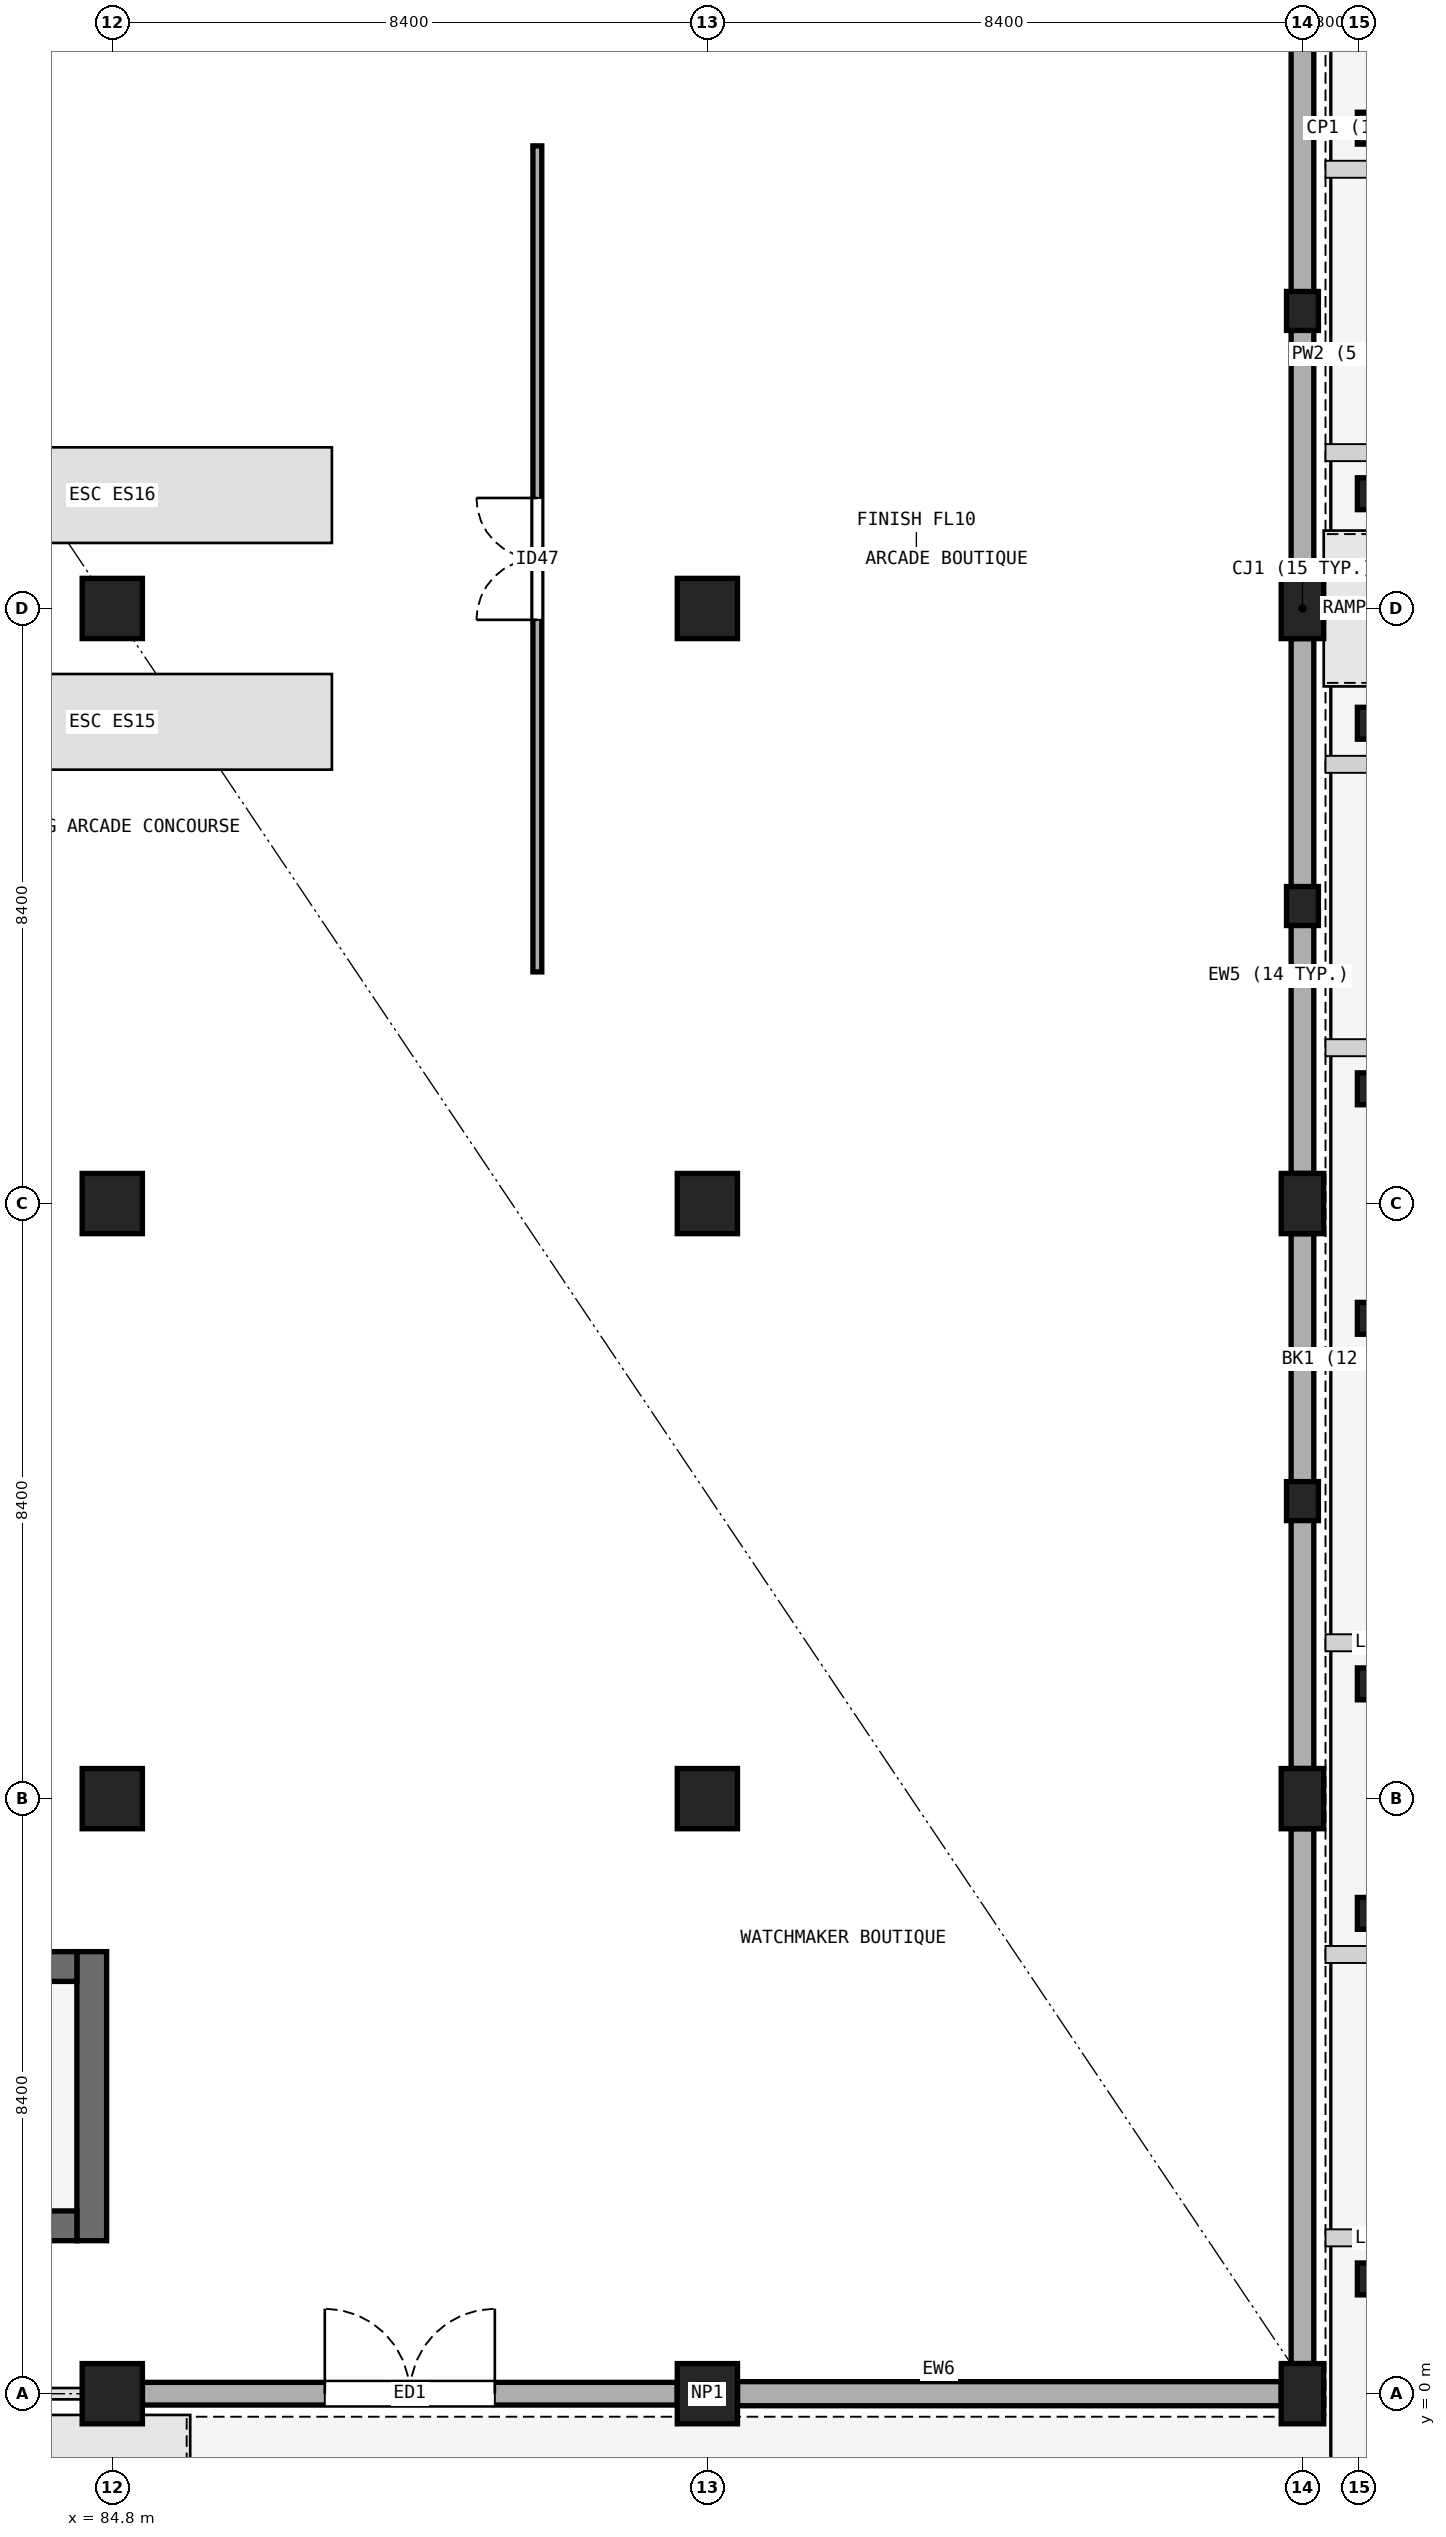
"""IFC4 building model, lengths in metres.
Left out: names, types, materials, properties, quantities, classifications, styles, units other than length and angle.
Written with IfcOpenShell. Run it as: python <this file> out.ifc"""

import sys

from ifc_helpers import new_model, si_unit, direction, frame, frame_2d, origin, origin_2d, place, context, subcontext, project, spatial, rectangle, extrude, element, fill, save


model = new_model("IFC4")
c1 = context("Model", 3, precision=1e-05, world=origin(), true_north=direction((0.0, 1.0)))
c2 = subcontext(c1, "Body", "Model", "MODEL_VIEW")
j1 = project(units=[si_unit("LENGTHUNIT", "METRE"), si_unit("PLANEANGLEUNIT", "RADIAN")], contexts=[c1])
p1 = place(None, origin())
s1 = spatial("IfcSite", under=j1, at=p1, CompositionType="ELEMENT")
p2 = place(p1, origin())
s2 = spatial("IfcBuilding", under=s1, at=p2, CompositionType="ELEMENT")
p3 = place(p2, origin())
s3 = spatial("IfcBuildingStorey", under=s2, at=p3, CompositionType="ELEMENT", Elevation=0.0)
for number, where, z_axis, x_axis in (
    (1, (84.8, 0.0, 0.0), (0.0, 0.0, 1.0), (1.0, 0.0, 0.0)),
    (2, (93.2, 0.0, 0.0), (0.0, 0.0, 1.0), (1.0, 0.0, 0.0)),
):
    element("IfcColumn", number, at=place(p3, frame(where, z_axis=z_axis, x_axis=x_axis)), inside=s3, PredefinedType="COLUMN", context=c2, shape_type="SweptSolid", body=[
        extrude(rectangle(XDim=0.85, YDim=0.85, at=origin_2d()), origin(), (0.0, 0.0, 1.0), 5.4),
    ])
p4 = place(p3, frame((101.6, 0.0, 0.0), z_axis=(0.0, 0.0, 1.0), x_axis=(1.0, 0.0, 0.0)))
e3 = element("IfcColumn", 3, at=p4, inside=s3, PredefinedType="COLUMN", context=c2, shape_type="SweptSolid", body=[
    extrude(rectangle(XDim=0.6, YDim=0.85, at=origin_2d()), origin(), (0.0, 0.0, 1.0), 5.4),
])
for number, where, z_axis, x_axis in (
    (4, (84.8, 8.4, 0.0), (0.0, 0.0, 1.0), (1.0, 0.0, 0.0)),
    (5, (93.2, 8.4, 0.0), (0.0, 0.0, 1.0), (1.0, 0.0, 0.0)),
):
    element("IfcColumn", number, at=place(p3, frame(where, z_axis=z_axis, x_axis=x_axis)), inside=s3, PredefinedType="COLUMN", context=c2, shape_type="SweptSolid", body=[
        extrude(rectangle(XDim=0.85, YDim=0.85, at=origin_2d()), origin(), (0.0, 0.0, 1.0), 5.4),
    ])
p5 = place(p3, frame((101.6, 8.4, 0.0), z_axis=(0.0, 0.0, 1.0), x_axis=(1.0, 0.0, 0.0)))
e6 = element("IfcColumn", 6, at=p5, inside=s3, PredefinedType="COLUMN", context=c2, shape_type="SweptSolid", body=[
    extrude(rectangle(XDim=0.6, YDim=0.85, at=origin_2d()), origin(), (0.0, 0.0, 1.0), 5.4),
])
for number, where, z_axis, x_axis in (
    (7, (84.8, 16.8, 0.0), (0.0, 0.0, 1.0), (1.0, 0.0, 0.0)),
    (8, (93.2, 16.8, 0.0), (0.0, 0.0, 1.0), (1.0, 0.0, 0.0)),
):
    element("IfcColumn", number, at=place(p3, frame(where, z_axis=z_axis, x_axis=x_axis)), inside=s3, PredefinedType="COLUMN", context=c2, shape_type="SweptSolid", body=[
        extrude(rectangle(XDim=0.85, YDim=0.85, at=origin_2d()), origin(), (0.0, 0.0, 1.0), 5.4),
    ])
p6 = place(p3, frame((101.6, 16.8, 0.0), z_axis=(0.0, 0.0, 1.0), x_axis=(1.0, 0.0, 0.0)))
e9 = element("IfcColumn", 9, at=p6, inside=s3, PredefinedType="COLUMN", context=c2, shape_type="SweptSolid", body=[
    extrude(rectangle(XDim=0.6, YDim=0.85, at=origin_2d()), origin(), (0.0, 0.0, 1.0), 5.4),
])
for number, where, z_axis, x_axis in (
    (10, (84.8, 25.2, 0.0), (0.0, 0.0, 1.0), (1.0, 0.0, 0.0)),
    (11, (93.2, 25.2, 0.0), (0.0, 0.0, 1.0), (1.0, 0.0, 0.0)),
):
    element("IfcColumn", number, at=place(p3, frame(where, z_axis=z_axis, x_axis=x_axis)), inside=s3, PredefinedType="COLUMN", context=c2, shape_type="SweptSolid", body=[
        extrude(rectangle(XDim=0.85, YDim=0.85, at=origin_2d()), origin(), (0.0, 0.0, 1.0), 5.4),
    ])
p7 = place(p3, frame((101.6, 25.2, 0.0), z_axis=(0.0, 0.0, 1.0), x_axis=(1.0, 0.0, 0.0)))
e12 = element("IfcColumn", 12, at=p7, inside=s3, PredefinedType="COLUMN", context=c2, shape_type="SweptSolid", body=[
    extrude(rectangle(XDim=0.6, YDim=0.85, at=origin_2d()), origin(), (0.0, 0.0, 1.0), 5.4),
])
for number, where, z_axis, x_axis in (
    (13, (101.6, 12.6, 0.0), (0.0, 0.0, 1.0), (1.0, 0.0, 0.0)),
    (14, (101.6, 21.0, 0.0), (0.0, 0.0, 1.0), (1.0, 0.0, 0.0)),
    (15, (101.6, 29.4, 0.0), (0.0, 0.0, 1.0), (1.0, 0.0, 0.0)),
    (16, (102.65, 1.62, 0.0), (0.0, 0.0, 1.0), (0.0, 1.0, 0.0)),
    (17, (102.65, 6.78, 0.0), (0.0, 0.0, 1.0), (0.0, 1.0, 0.0)),
    (18, (102.65, 10.02, 0.0), (0.0, 0.0, 1.0), (0.0, 1.0, 0.0)),
    (19, (102.65, 15.18, 0.0), (0.0, 0.0, 1.0), (0.0, 1.0, 0.0)),
    (20, (102.65, 18.42, 0.0), (0.0, 0.0, 1.0), (0.0, 1.0, 0.0)),
    (21, (102.65, 23.58, 0.0), (0.0, 0.0, 1.0), (0.0, 1.0, 0.0)),
    (22, (102.65, 26.82, 0.0), (0.0, 0.0, 1.0), (0.0, 1.0, 0.0)),
    (23, (102.65, 31.98, 0.0), (0.0, 0.0, 1.0), (0.0, 1.0, 0.0)),
):
    element("IfcColumn", number, at=place(p3, frame(where, z_axis=z_axis, x_axis=x_axis)), inside=s3, PredefinedType="PILASTER", context=c2, shape_type="SweptSolid", body=[
        extrude(rectangle(XDim=0.45, YDim=0.55, at=origin_2d()), origin(), (0.0, 0.0, 1.0), 5.4),
    ])
p8 = place(p3, frame((85.225, 0.0, 0.0), z_axis=(0.0, 0.0, 1.0), x_axis=(1.0, 0.0, 0.0)))
e24 = element("IfcWall", 24, at=p8, inside=s3, PredefinedType="SOLIDWALL", context=c2, shape_type="SweptSolid", body=[
    extrude(rectangle(XDim=7.55, YDim=0.32, at=frame_2d((3.775, 0.0))), origin(), (0.0, 0.0, 1.0), 4.35),
])
p9 = place(p8, frame((2.575, 0.0, 0.0)))
e25 = element("IfcOpeningElement", 25, at=p9, cuts=e24, PredefinedType="OPENING", context=c2, shape_type="SweptSolid", body=[
    extrude(rectangle(XDim=2.4, YDim=2.6, at=frame_2d((1.2, 1.3))), frame((0.0, 0.17, 0.0), z_axis=(0.0, -1.0, 0.0), x_axis=(1.0, 0.0, 0.0)), (0.0, 0.0, 1.0), 0.34),
])
p10 = place(p3, frame((93.625, 0.0, 0.0), z_axis=(0.0, 0.0, 1.0), x_axis=(1.0, 0.0, 0.0)))
e26 = element("IfcWall", 26, at=p10, inside=s3, PredefinedType="SOLIDWALL", context=c2, shape_type="SweptSolid", body=[
    extrude(rectangle(XDim=7.675, YDim=0.34, at=frame_2d((3.837, 0.0))), origin(), (0.0, 0.0, 1.0), 4.35),
])
for number, where, z_axis, x_axis in (
    (27, (101.6, 0.425, 0.0), (0.0, 0.0, 1.0), (0.0, 1.0, 0.0)),
    (28, (101.6, 8.825, 0.0), (0.0, 0.0, 1.0), (0.0, 1.0, 0.0)),
):
    element("IfcWall", number, at=place(p3, frame(where, z_axis=z_axis, x_axis=x_axis)), inside=s3, PredefinedType="SOLIDWALL", context=c2, shape_type="SweptSolid", body=[
        extrude(rectangle(XDim=7.55, YDim=0.32, at=frame_2d((3.775, 0.0))), origin(), (0.0, 0.0, 1.0), 4.35),
    ])
p11 = place(p3, frame((101.6, 17.225, 0.0), z_axis=(0.0, 0.0, 1.0), x_axis=(0.0, 1.0, 0.0)))
e29 = element("IfcWall", 29, at=p11, inside=s3, PredefinedType="SOLIDWALL", context=c2, shape_type="SweptSolid", body=[
    extrude(rectangle(XDim=7.55, YDim=0.32, at=frame_2d((3.775, 0.0))), origin(), (0.0, 0.0, 1.0), 4.35),
])
p12 = place(p3, frame((101.6, 25.625, 0.0), z_axis=(0.0, 0.0, 1.0), x_axis=(0.0, 1.0, 0.0)))
e30 = element("IfcWall", 30, at=p12, inside=s3, PredefinedType="SOLIDWALL", context=c2, shape_type="SweptSolid", body=[
    extrude(rectangle(XDim=7.55, YDim=0.32, at=frame_2d((3.775, 0.0))), origin(), (0.0, 0.0, 1.0), 4.35),
])
p13 = place(p3, frame((84.51, 2.16, 0.0), z_axis=(0.0, 0.0, 1.0), x_axis=(0.0, 1.0, 0.0)))
e31 = element("IfcWall", 31, at=p13, inside=s3, PredefinedType="SHEAR", context=c2, shape_type="SweptSolid", body=[
    extrude(rectangle(XDim=4.08, YDim=0.42, at=frame_2d((2.04, 0.0))), origin(), (0.0, 0.0, 1.0), 5.1),
])
for number, where, z_axis, x_axis in (
    (32, (76.9, 2.37, 0.0), (0.0, 0.0, 1.0), (1.0, 0.0, 0.0)),
    (33, (76.9, 6.03, 0.0), (0.0, 0.0, 1.0), (1.0, 0.0, 0.0)),
):
    element("IfcWall", number, at=place(p3, frame(where, z_axis=z_axis, x_axis=x_axis)), inside=s3, PredefinedType="SHEAR", context=c2, shape_type="SweptSolid", body=[
        extrude(rectangle(XDim=7.4, YDim=0.42, at=frame_2d((3.7, 0.0))), origin(), (0.0, 0.0, 1.0), 5.1),
    ])
p14 = place(p3, frame((90.8, 20.07, 0.0), z_axis=(0.0, 0.0, 1.0), x_axis=(0.0, 1.0, 0.0)))
e34 = element("IfcWall", 34, at=p14, inside=s3, PredefinedType="PARTITIONING", context=c2, shape_type="SweptSolid", body=[
    extrude(rectangle(XDim=11.66, YDim=0.125, at=frame_2d((5.83, 0.0))), origin(), (0.0, 0.0, 1.0), 4.4),
])
p15 = place(p14, frame((4.97, 0.0, 0.0)))
e35 = element("IfcOpeningElement", 35, at=p15, cuts=e34, PredefinedType="OPENING", context=c2, shape_type="SweptSolid", body=[
    extrude(rectangle(XDim=1.72, YDim=2.1, at=frame_2d((0.86, 1.05))), frame((0.0, 0.073, 0.0), z_axis=(0.0, -1.0, 0.0), x_axis=(1.0, 0.0, 0.0)), (0.0, 0.0, 1.0), 0.145),
])
p16 = place(p9, origin())
e36 = element("IfcDoor", 36, at=p16, inside=s3, OperationType="DOUBLE_DOOR_SINGLE_SWING", PredefinedType="DOOR", context=c2, shape_type="SweptSolid", body=[
    extrude(rectangle(XDim=2.4, YDim=2.6, at=frame_2d((1.2, 1.3))), frame((0.0, 0.025, 0.0), z_axis=(0.0, -1.0, 0.0), x_axis=(1.0, 0.0, 0.0)), (0.0, 0.0, 1.0), 0.05),
])
fill(e25, e36)
p17 = place(p15, origin())
e37 = element("IfcDoor", 37, at=p17, inside=s3, OperationType="DOUBLE_DOOR_SINGLE_SWING", PredefinedType="DOOR", context=c2, shape_type="SweptSolid", body=[
    extrude(rectangle(XDim=1.72, YDim=2.1, at=frame_2d((0.86, 1.05))), frame((0.0, 0.025, 0.0), z_axis=(0.0, -1.0, 0.0), x_axis=(1.0, 0.0, 0.0)), (0.0, 0.0, 1.0), 0.05),
])
fill(e35, e37)
save(model, sys.argv[1])
